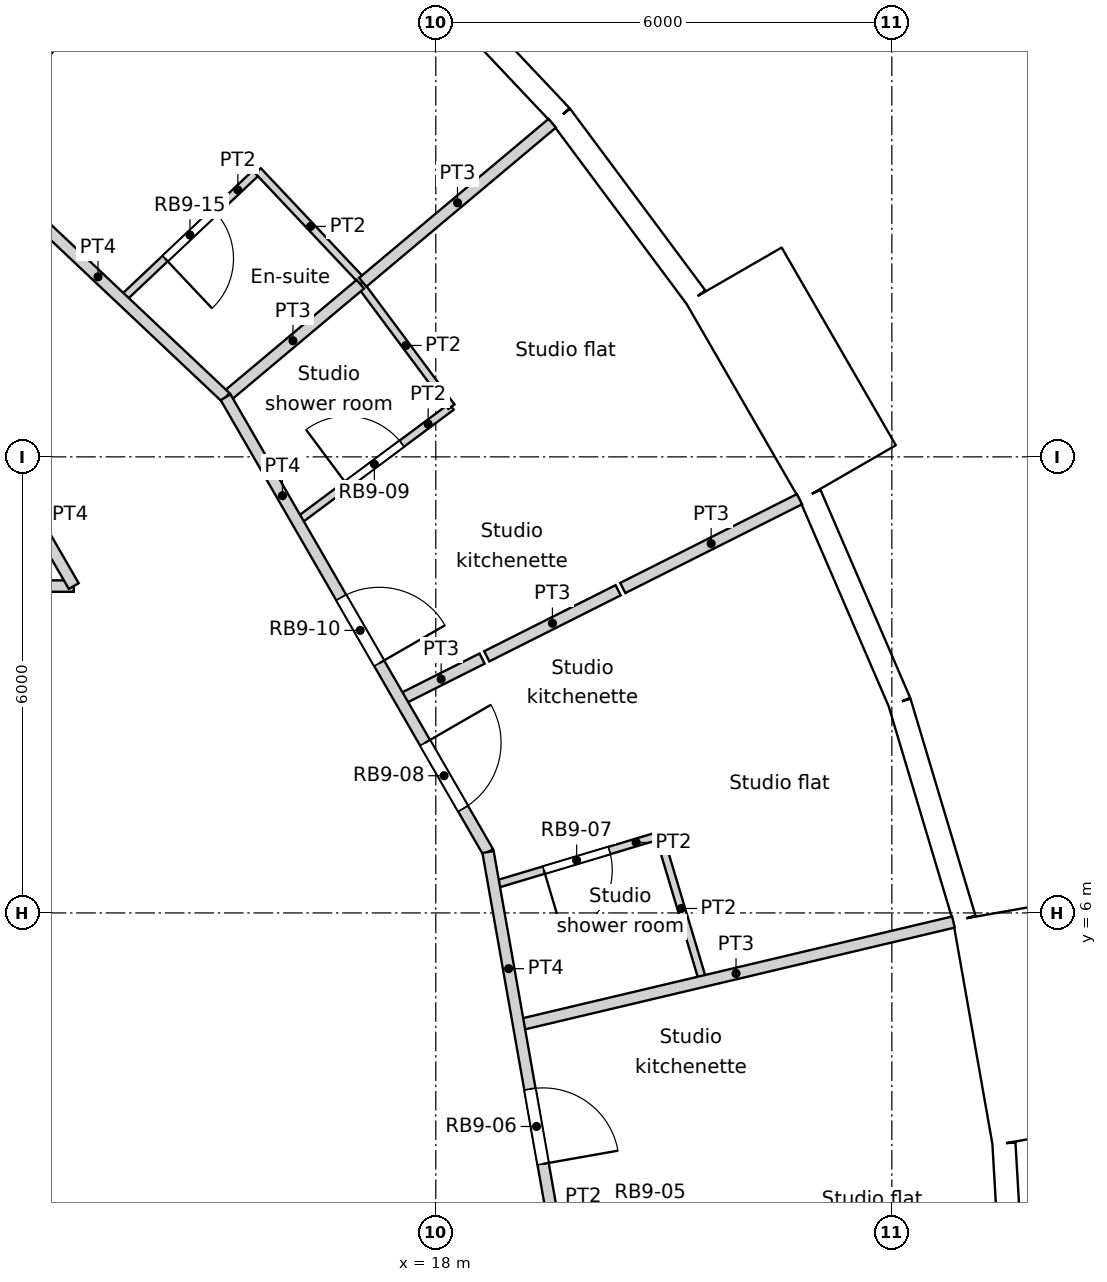
"""IFC4 building model, lengths in metres.
Left out: names, types, materials, properties, quantities, classifications, styles, units other than length and angle.
Written with IfcOpenShell. Run it as: python <this file> out.ifc"""

import sys

from ifc_helpers import new_model, si_unit, direction, frame, frame_2d, origin, origin_2d, place, context, subcontext, project, spatial, rectangle, circle, extrude, element, fill, save


model = new_model("IFC4")
c1 = context("Model", 3, precision=1e-05, world=origin(), true_north=direction((0.0, 1.0)))
c2 = subcontext(c1, "Body", "Model", "MODEL_VIEW")
j1 = project(units=[si_unit("LENGTHUNIT", "METRE"), si_unit("PLANEANGLEUNIT", "RADIAN")], contexts=[c1])
p1 = place(None, origin())
s1 = spatial("IfcSite", under=j1, at=p1, CompositionType="ELEMENT")
p2 = place(p1, origin())
s2 = spatial("IfcBuilding", under=s1, at=p2, CompositionType="ELEMENT")
p3 = place(p2, frame((0.0, 0.0, 212.4)))
s3 = spatial("IfcBuildingStorey", under=s2, at=p3, CompositionType="ELEMENT", Elevation=212.4)
for number, where, z_axis, x_axis in (
    (1, (23.886, 5.661, 0.0), (0.0, 0.0, 1.0), (1.0, 0.0, 0.0)),
    (2, (21.937, 11.017, 0.0), (0.0, 0.0, 1.0), (1.0, 0.0, 0.0)),
    (3, (18.805, 15.779, 0.0), (0.0, 0.0, 1.0), (1.0, 0.0, 0.0)),
):
    element("IfcColumn", number, at=place(p3, frame(where, z_axis=z_axis, x_axis=x_axis)), inside=s3, PredefinedType="COLUMN", context=c2, shape_type="SweptSolid", body=[
        extrude(circle(Radius=0.6, at=origin_2d()), origin(), (0.0, 0.0, 1.0), 3.6),
    ])
for number, where, z_axis, x_axis in (
    (4, (17.986, 5.548, 0.0), (0.0, 0.0, 1.0), (1.0, 0.0, 0.0)),
    (5, (15.552, 10.603, 0.0), (0.0, 0.0, 1.0), (1.0, 0.0, 0.0)),
):
    element("IfcColumn", number, at=place(p3, frame(where, z_axis=z_axis, x_axis=x_axis)), inside=s3, PredefinedType="COLUMN", context=c2, shape_type="SweptSolid", body=[
        extrude(circle(Radius=0.65, at=origin_2d()), origin(), (0.0, 0.0, 1.0), 3.6),
    ])
p4 = place(p3, frame((25.647, 0.0, 0.0), z_axis=(0.0, 0.0, 1.0), x_axis=(-0.058144307138, 0.998308188661, 0.0)))
e6 = element("IfcWall", 6, at=p4, inside=s3, PredefinedType="SOLIDWALL", context=c2, shape_type="SweptSolid", body=[
    extrude(rectangle(XDim=2.973, YDim=0.3, at=frame_2d((1.486, 0.0))), origin(), (0.0, 0.0, 1.0), 3.3),
])
p5 = place(p4, frame((1.486, 0.0, 1.55)))
e7 = element("IfcOpeningElement", 7, at=p5, cuts=e6, PredefinedType="OPENING", context=c2, shape_type="SweptSolid", body=[
    extrude(circle(Radius=0.9, at=origin_2d()), frame((0.0, 0.16, 0.0), z_axis=(0.0, -1.0, 0.0), x_axis=(1.0, 0.0, 0.0)), (0.0, 0.0, 1.0), 0.32),
])
p6 = place(p3, frame((26.042, 3.069, -0.3), z_axis=(0.0, 0.0, 1.0), x_axis=(-0.173669267716, 0.984804034035, 0.0)))
e8 = element("IfcWall", 8, at=p6, inside=s3, PredefinedType="ELEMENTEDWALL", context=c2, shape_type="SweptSolid", body=[
    extrude(rectangle(XDim=3.0, YDim=1.45, at=frame_2d((1.5, 0.0))), origin(), (0.0, 0.0, 1.0), 3.6),
])
p7 = place(p6, frame((1.5, 0.0, 1.85)))
e9 = element("IfcOpeningElement", 9, at=p7, cuts=e8, PredefinedType="OPENING", context=c2, shape_type="SweptSolid", body=[
    extrude(circle(Radius=0.9, at=origin_2d()), frame((0.0, 0.735, 0.0), z_axis=(0.0, -1.0, 0.0), x_axis=(1.0, 0.0, 0.0)), (0.0, 0.0, 1.0), 1.47),
])
p8 = place(p3, frame((24.953, 5.924, 0.0), z_axis=(0.0, 0.0, 1.0), x_axis=(-0.286782750849, 0.957995643944, 0.0)))
e10 = element("IfcWall", 10, at=p8, inside=s3, PredefinedType="SOLIDWALL", context=c2, shape_type="SweptSolid", body=[
    extrude(rectangle(XDim=2.973, YDim=0.3, at=frame_2d((1.486, 0.0))), origin(), (0.0, 0.0, 1.0), 3.3),
])
p9 = place(p8, frame((1.486, 0.0, 1.55)))
e11 = element("IfcOpeningElement", 11, at=p9, cuts=e10, PredefinedType="OPENING", context=c2, shape_type="SweptSolid", body=[
    extrude(circle(Radius=0.9, at=origin_2d()), frame((0.0, 0.16, 0.0), z_axis=(0.0, -1.0, 0.0), x_axis=(1.0, 0.0, 0.0)), (0.0, 0.0, 1.0), 0.32),
])
p10 = place(p3, frame((24.101, 8.772, 0.0), z_axis=(0.0, 0.0, 1.0), x_axis=(-0.396148129016, 0.918186614952, 0.0)))
e12 = element("IfcWall", 12, at=p10, inside=s3, PredefinedType="SOLIDWALL", context=c2, shape_type="SweptSolid", body=[
    extrude(rectangle(XDim=2.973, YDim=0.3, at=frame_2d((1.486, 0.0))), origin(), (0.0, 0.0, 1.0), 3.3),
])
p11 = place(p10, frame((1.486, 0.0, 1.55)))
e13 = element("IfcOpeningElement", 13, at=p11, cuts=e12, PredefinedType="OPENING", context=c2, shape_type="SweptSolid", body=[
    extrude(circle(Radius=0.9, at=origin_2d()), frame((0.0, 0.16, 0.0), z_axis=(0.0, -1.0, 0.0), x_axis=(1.0, 0.0, 0.0)), (0.0, 0.0, 1.0), 0.32),
])
p12 = place(p3, frame((23.422, 11.791, -0.3), z_axis=(0.0, 0.0, 1.0), x_axis=(-0.499990139034, 0.866031096941, 0.0)))
e14 = element("IfcWall", 14, at=p12, inside=s3, PredefinedType="ELEMENTEDWALL", context=c2, shape_type="SweptSolid", body=[
    extrude(rectangle(XDim=3.0, YDim=1.45, at=frame_2d((1.5, 0.0))), origin(), (0.0, 0.0, 1.0), 3.6),
])
p13 = place(p12, frame((1.5, 0.0, 1.85)))
e15 = element("IfcOpeningElement", 15, at=p13, cuts=e14, PredefinedType="OPENING", context=c2, shape_type="SweptSolid", body=[
    extrude(circle(Radius=0.9, at=origin_2d()), frame((0.0, 0.735, 0.0), z_axis=(0.0, -1.0, 0.0), x_axis=(1.0, 0.0, 0.0)), (0.0, 0.0, 1.0), 1.47),
])
p14 = place(p3, frame((21.422, 14.101, 0.0), z_axis=(0.0, 0.0, 1.0), x_axis=(-0.597197580538, 0.80209416517, 0.0)))
e16 = element("IfcWall", 16, at=p14, inside=s3, PredefinedType="SOLIDWALL", context=c2, shape_type="SweptSolid", body=[
    extrude(rectangle(XDim=2.973, YDim=0.3, at=frame_2d((1.486, 0.0))), origin(), (0.0, 0.0, 1.0), 3.3),
])
p15 = place(p14, frame((1.486, 0.0, 1.55)))
e17 = element("IfcOpeningElement", 17, at=p15, cuts=e16, PredefinedType="OPENING", context=c2, shape_type="SweptSolid", body=[
    extrude(circle(Radius=0.9, at=origin_2d()), frame((0.0, 0.16, 0.0), z_axis=(0.0, -1.0, 0.0), x_axis=(1.0, 0.0, 0.0)), (0.0, 0.0, 1.0), 0.32),
])
p16 = place(p3, frame((19.647, 16.486, 0.0), z_axis=(0.0, 0.0, 1.0), x_axis=(-0.686235184166, 0.727379730273, 0.0)))
e18 = element("IfcWall", 18, at=p16, inside=s3, PredefinedType="SOLIDWALL", context=c2, shape_type="SweptSolid", body=[
    extrude(rectangle(XDim=2.973, YDim=0.3, at=frame_2d((1.486, 0.0))), origin(), (0.0, 0.0, 1.0), 3.3),
])
p17 = place(p16, frame((1.486, 0.0, 1.55)))
e19 = element("IfcOpeningElement", 19, at=p17, cuts=e18, PredefinedType="OPENING", context=c2, shape_type="SweptSolid", body=[
    extrude(circle(Radius=0.9, at=origin_2d()), frame((0.0, 0.16, 0.0), z_axis=(0.0, -1.0, 0.0), x_axis=(1.0, 0.0, 0.0)), (0.0, 0.0, 1.0), 0.32),
])
p18 = place(p3, frame((-3.025, 10.3, 0.0), z_axis=(0.0, 0.0, 1.0), x_axis=(1.0, 0.0, 0.0)))
e20 = element("IfcWall", 20, at=p18, inside=s3, PredefinedType="PARTITIONING", context=c2, shape_type="SweptSolid", body=[
    extrude(rectangle(XDim=16.262, YDim=0.15, at=frame_2d((8.131, 0.0))), origin(), (0.0, 0.0, 1.0), 3.15),
])
p19 = place(p18, frame((7.288, 0.0, 0.0)))
e21 = element("IfcOpeningElement", 21, at=p19, cuts=e20, PredefinedType="OPENING", context=c2, shape_type="SweptSolid", body=[
    extrude(rectangle(XDim=0.95, YDim=2.1, at=frame_2d((0.475, 1.05))), frame((0.0, 0.075, 0.0), z_axis=(0.0, -1.0, 0.0), x_axis=(1.0, 0.0, 0.0)), (0.0, 0.0, 1.0), 0.15),
])
p20 = place(p3, frame((12.162, 12.162, 0.0), z_axis=(0.0, 0.0, 1.0), x_axis=(0.499961633463, -0.866047553582, 0.0)))
e22 = element("IfcWall", 22, at=p20, inside=s3, PredefinedType="PARTITIONING", context=c2, shape_type="SweptSolid", body=[
    extrude(rectangle(XDim=2.15, YDim=0.15, at=frame_2d((1.075, 0.0))), origin(), (0.0, 0.0, 1.0), 3.15),
])
p21 = place(p3, frame((18.688, 6.802, 0.0), z_axis=(0.0, 0.0, 1.0), x_axis=(0.173831710537, -0.984775373581, 0.0)))
e23 = element("IfcWall", 23, at=p21, inside=s3, PredefinedType="PARTITIONING", context=c2, shape_type="SweptSolid", body=[
    extrude(rectangle(XDim=6.907, YDim=0.15, at=frame_2d((3.454, 0.0))), origin(), (0.0, 0.0, 1.0), 3.15),
])
p22 = place(p21, frame((3.167, 0.0, 0.0)))
e24 = element("IfcOpeningElement", 24, at=p22, cuts=e23, PredefinedType="OPENING", context=c2, shape_type="SweptSolid", body=[
    extrude(rectangle(XDim=1.0, YDim=2.1, at=frame_2d((0.5, 1.05))), frame((0.0, 0.075, 0.0), z_axis=(0.0, -1.0, 0.0), x_axis=(1.0, 0.0, 0.0)), (0.0, 0.0, 1.0), 0.15),
])
p23 = place(p3, frame((15.235, 12.784, 0.0), z_axis=(0.0, 0.0, 1.0), x_axis=(0.499940714931, -0.86605962933, 0.0)))
e25 = element("IfcWall", 25, at=p23, inside=s3, PredefinedType="PARTITIONING", context=c2, shape_type="SweptSolid", body=[
    extrude(rectangle(XDim=6.907, YDim=0.15, at=frame_2d((3.454, 0.0))), origin(), (0.0, 0.0, 1.0), 3.15),
])
p24 = place(p23, frame((5.249, 0.0, 0.0)))
e26 = element("IfcOpeningElement", 26, at=p24, cuts=e25, PredefinedType="OPENING", context=c2, shape_type="SweptSolid", body=[
    extrude(rectangle(XDim=1.0, YDim=2.1, at=frame_2d((0.5, 1.05))), frame((0.0, 0.075, 0.0), z_axis=(0.0, -1.0, 0.0), x_axis=(1.0, 0.0, 0.0)), (0.0, 0.0, 1.0), 0.15),
])
p25 = place(p23, frame((3.041, 0.0, 0.0)))
e27 = element("IfcOpeningElement", 27, at=p25, cuts=e25, PredefinedType="OPENING", context=c2, shape_type="SweptSolid", body=[
    extrude(rectangle(XDim=1.0, YDim=2.1, at=frame_2d((0.5, 1.05))), frame((0.0, 0.075, 0.0), z_axis=(0.0, -1.0, 0.0), x_axis=(1.0, 0.0, 0.0)), (0.0, 0.0, 1.0), 0.15),
])
p26 = place(p3, frame((11.877, 15.953, 0.0), z_axis=(0.0, 0.0, 1.0), x_axis=(0.727299029876, -0.686320713035, 0.0)))
e28 = element("IfcWall", 28, at=p26, inside=s3, PredefinedType="PARTITIONING", context=c2, shape_type="SweptSolid", body=[
    extrude(rectangle(XDim=4.617, YDim=0.15, at=frame_2d((2.309, 0.0))), origin(), (0.0, 0.0, 1.0), 3.15),
])
p27 = place(p3, frame((19.09, 4.525, 0.0), z_axis=(0.0, 0.0, 1.0), x_axis=(0.973093766115, 0.230409466707, 0.0)))
e29 = element("IfcWall", 29, at=p27, inside=s3, PredefinedType="PARTITIONING", context=c2, shape_type="SweptSolid", body=[
    extrude(rectangle(XDim=5.879, YDim=0.15, at=frame_2d((2.939, 0.0))), origin(), (0.0, 0.0, 1.0), 3.15),
])
p28 = place(p3, frame((20.941, 7.018, 0.0), z_axis=(0.0, 0.0, 1.0), x_axis=(0.287124264191, -0.957893343182, 0.0)))
e30 = element("IfcWall", 30, at=p28, inside=s3, PredefinedType="PARTITIONING", context=c2, shape_type="SweptSolid", body=[
    extrude(rectangle(XDim=2.003, YDim=0.1, at=frame_2d((1.002, 0.0))), origin(), (0.0, 0.0, 1.0), 3.15),
])
p29 = place(p3, frame((18.765, 6.367, 0.0), z_axis=(0.0, 0.0, 1.0), x_axis=(0.958030169919, 0.286667391807, 0.0)))
e31 = element("IfcWall", 31, at=p29, inside=s3, PredefinedType="PARTITIONING", context=c2, shape_type="SweptSolid", body=[
    extrude(rectangle(XDim=2.271, YDim=0.1, at=frame_2d((1.136, 0.0))), origin(), (0.0, 0.0, 1.0), 3.15),
])
p30 = place(p29, frame((0.685, 0.0, 0.0)))
e32 = element("IfcOpeningElement", 32, at=p30, cuts=e31, PredefinedType="OPENING", context=c2, shape_type="SweptSolid", body=[
    extrude(rectangle(XDim=0.9, YDim=2.04, at=frame_2d((0.45, 1.02))), frame((0.0, 0.05, 0.0), z_axis=(0.0, -1.0, 0.0), x_axis=(1.0, 0.0, 0.0)), (0.0, 0.0, 1.0), 0.1),
])
p31 = place(p3, frame((17.532, 8.805, 0.0), z_axis=(0.0, 0.0, 1.0), x_axis=(0.893574741649, 0.448914447403, 0.0)))
e33 = element("IfcWall", 33, at=p31, inside=s3, PredefinedType="PARTITIONING", context=c2, shape_type="SweptSolid", body=[
    extrude(rectangle(XDim=1.205, YDim=0.15, at=frame_2d((0.603, 0.0))), origin(), (0.0, 0.0, 1.0), 3.15),
])
p32 = place(p3, frame((20.46, 10.275, 0.0), z_axis=(0.0, 0.0, 1.0), x_axis=(0.893543449143, 0.448976730458, 0.0)))
e34 = element("IfcWall", 34, at=p32, inside=s3, PredefinedType="PARTITIONING", context=c2, shape_type="SweptSolid", body=[
    extrude(rectangle(XDim=2.602, YDim=0.15, at=frame_2d((1.301, 0.0))), origin(), (0.0, 0.0, 1.0), 3.15),
])
p33 = place(p3, frame((18.67, 9.376, 0.0), z_axis=(0.0, 0.0, 1.0), x_axis=(0.893466318026, 0.449130202227, 0.0)))
e35 = element("IfcWall", 35, at=p33, inside=s3, PredefinedType="PARTITIONING", context=c2, shape_type="SweptSolid", body=[
    extrude(rectangle(XDim=1.935, YDim=0.15, at=frame_2d((0.968, 0.0))), origin(), (0.0, 0.0, 1.0), 3.15),
])
p34 = place(p3, frame((16.178, 11.15, 0.0), z_axis=(0.0, 0.0, 1.0), x_axis=(0.8020923136, 0.597200067367, 0.0)))
e36 = element("IfcWall", 36, at=p34, inside=s3, PredefinedType="PARTITIONING", context=c2, shape_type="SweptSolid", body=[
    extrude(rectangle(XDim=2.529, YDim=0.1, at=frame_2d((1.264, 0.0))), origin(), (0.0, 0.0, 1.0), 3.15),
])
p35 = place(p34, frame((0.814, 0.0, 0.0)))
e37 = element("IfcOpeningElement", 37, at=p35, cuts=e36, PredefinedType="OPENING", context=c2, shape_type="SweptSolid", body=[
    extrude(rectangle(XDim=0.9, YDim=2.04, at=frame_2d((0.45, 1.02))), frame((0.0, 0.05, 0.0), z_axis=(0.0, -1.0, 0.0), x_axis=(1.0, 0.0, 0.0)), (0.0, 0.0, 1.0), 0.1),
])
p36 = place(p3, frame((17.007, 14.271, 0.0), z_axis=(0.0, 0.0, 1.0), x_axis=(0.597019866774, -0.802226450996, 0.0)))
e38 = element("IfcWall", 38, at=p36, inside=s3, PredefinedType="PARTITIONING", context=c2, shape_type="SweptSolid", body=[
    extrude(rectangle(XDim=2.008, YDim=0.1, at=frame_2d((1.004, 0.0))), origin(), (0.0, 0.0, 1.0), 3.15),
])
p37 = place(p3, frame((17.039, 14.297, 0.0), z_axis=(0.0, 0.0, 1.0), x_axis=(0.766046154737, 0.642785569854, 0.0)))
e39 = element("IfcWall", 39, at=p37, inside=s3, PredefinedType="PARTITIONING", context=c2, shape_type="SweptSolid", body=[
    extrude(rectangle(XDim=3.254, YDim=0.15, at=frame_2d((1.627, 0.0))), origin(), (0.0, 0.0, 1.0), 3.15),
])
p38 = place(p3, frame((15.235, 12.784, 0.0), z_axis=(0.0, 0.0, 1.0), x_axis=(0.766002094084, 0.642838075925, 0.0)))
e40 = element("IfcWall", 40, at=p38, inside=s3, PredefinedType="PARTITIONING", context=c2, shape_type="SweptSolid", body=[
    extrude(rectangle(XDim=2.313, YDim=0.15, at=frame_2d((1.157, 0.0))), origin(), (0.0, 0.0, 1.0), 3.15),
])
p39 = place(p3, frame((11.876, 15.952, 0.0), z_axis=(0.0, 0.0, 1.0), x_axis=(0.596899091673, 0.802316318144, 0.0)))
e41 = element("IfcWall", 41, at=p39, inside=s3, PredefinedType="PARTITIONING", context=c2, shape_type="SweptSolid", body=[
    extrude(rectangle(XDim=2.094, YDim=0.1, at=frame_2d((1.047, 0.0))), origin(), (0.0, 0.0, 1.0), 3.15),
])
p40 = place(p3, frame((15.662, 15.763, 0.0), z_axis=(0.0, 0.0, 1.0), x_axis=(0.686167098493, -0.727443958629, 0.0)))
e42 = element("IfcWall", 42, at=p40, inside=s3, PredefinedType="PARTITIONING", context=c2, shape_type="SweptSolid", body=[
    extrude(rectangle(XDim=2.011, YDim=0.1, at=frame_2d((1.005, 0.0))), origin(), (0.0, 0.0, 1.0), 3.15),
])
p41 = place(p3, frame((13.87, 14.072, 0.0), z_axis=(0.0, 0.0, 1.0), x_axis=(0.727320856717, 0.686297582237, 0.0)))
e43 = element("IfcWall", 43, at=p41, inside=s3, PredefinedType="PARTITIONING", context=c2, shape_type="SweptSolid", body=[
    extrude(rectangle(XDim=2.464, YDim=0.1, at=frame_2d((1.232, 0.0))), origin(), (0.0, 0.0, 1.0), 3.15),
])
p42 = place(p41, frame((0.782, 0.0, 0.0)))
e44 = element("IfcOpeningElement", 44, at=p42, cuts=e43, PredefinedType="OPENING", context=c2, shape_type="SweptSolid", body=[
    extrude(rectangle(XDim=0.9, YDim=2.04, at=frame_2d((0.45, 1.02))), frame((0.0, 0.05, 0.0), z_axis=(0.0, -1.0, 0.0), x_axis=(1.0, 0.0, 0.0)), (0.0, 0.0, 1.0), 0.1),
])
p43 = place(p5, origin())
e45 = element("IfcWindow", 45, at=p43, inside=s3, PartitioningType="SINGLE_PANEL", PredefinedType="WINDOW", context=c2, shape_type="SweptSolid", body=[
    extrude(circle(Radius=0.9, at=origin_2d()), frame((0.0, 0.12, 0.0), z_axis=(0.0, -1.0, 0.0), x_axis=(1.0, 0.0, 0.0)), (0.0, 0.0, 1.0), 0.1),
])
fill(e7, e45)
p44 = place(p7, origin())
e46 = element("IfcWindow", 46, at=p44, inside=s3, PartitioningType="SINGLE_PANEL", PredefinedType="WINDOW", context=c2, shape_type="SweptSolid", body=[
    extrude(circle(Radius=0.9, at=origin_2d()), frame((0.0, 0.695, 0.0), z_axis=(0.0, -1.0, 0.0), x_axis=(1.0, 0.0, 0.0)), (0.0, 0.0, 1.0), 0.1),
])
fill(e9, e46)
p45 = place(p9, origin())
e47 = element("IfcWindow", 47, at=p45, inside=s3, PartitioningType="SINGLE_PANEL", PredefinedType="WINDOW", context=c2, shape_type="SweptSolid", body=[
    extrude(circle(Radius=0.9, at=origin_2d()), frame((0.0, 0.12, 0.0), z_axis=(0.0, -1.0, 0.0), x_axis=(1.0, 0.0, 0.0)), (0.0, 0.0, 1.0), 0.1),
])
fill(e11, e47)
p46 = place(p11, origin())
e48 = element("IfcWindow", 48, at=p46, inside=s3, PartitioningType="SINGLE_PANEL", PredefinedType="WINDOW", context=c2, shape_type="SweptSolid", body=[
    extrude(circle(Radius=0.9, at=origin_2d()), frame((0.0, 0.12, 0.0), z_axis=(0.0, -1.0, 0.0), x_axis=(1.0, 0.0, 0.0)), (0.0, 0.0, 1.0), 0.1),
])
fill(e13, e48)
p47 = place(p13, origin())
e49 = element("IfcWindow", 49, at=p47, inside=s3, PartitioningType="SINGLE_PANEL", PredefinedType="WINDOW", context=c2, shape_type="SweptSolid", body=[
    extrude(circle(Radius=0.9, at=origin_2d()), frame((0.0, 0.695, 0.0), z_axis=(0.0, -1.0, 0.0), x_axis=(1.0, 0.0, 0.0)), (0.0, 0.0, 1.0), 0.1),
])
fill(e15, e49)
p48 = place(p15, origin())
e50 = element("IfcWindow", 50, at=p48, inside=s3, PartitioningType="SINGLE_PANEL", PredefinedType="WINDOW", context=c2, shape_type="SweptSolid", body=[
    extrude(circle(Radius=0.9, at=origin_2d()), frame((0.0, 0.12, 0.0), z_axis=(0.0, -1.0, 0.0), x_axis=(1.0, 0.0, 0.0)), (0.0, 0.0, 1.0), 0.1),
])
fill(e17, e50)
p49 = place(p17, origin())
e51 = element("IfcWindow", 51, at=p49, inside=s3, PartitioningType="SINGLE_PANEL", PredefinedType="WINDOW", context=c2, shape_type="SweptSolid", body=[
    extrude(circle(Radius=0.9, at=origin_2d()), frame((0.0, 0.12, 0.0), z_axis=(0.0, -1.0, 0.0), x_axis=(1.0, 0.0, 0.0)), (0.0, 0.0, 1.0), 0.1),
])
fill(e19, e51)
p50 = place(p22, origin())
e52 = element("IfcDoor", 52, at=p50, inside=s3, OperationType="SINGLE_SWING_RIGHT", PredefinedType="DOOR", context=c2, shape_type="SweptSolid", body=[
    extrude(rectangle(XDim=1.0, YDim=2.1, at=frame_2d((0.5, 1.05))), frame((0.0, 0.025, 0.0), z_axis=(0.0, -1.0, 0.0), x_axis=(1.0, 0.0, 0.0)), (0.0, 0.0, 1.0), 0.05),
])
fill(e24, e52)
p51 = place(p30, origin())
e53 = element("IfcDoor", 53, at=p51, inside=s3, OperationType="SINGLE_SWING_RIGHT", PredefinedType="DOOR", context=c2, shape_type="SweptSolid", body=[
    extrude(rectangle(XDim=0.9, YDim=2.04, at=frame_2d((0.45, 1.02))), frame((0.0, 0.025, 0.0), z_axis=(0.0, -1.0, 0.0), x_axis=(1.0, 0.0, 0.0)), (0.0, 0.0, 1.0), 0.05),
])
fill(e32, e53)
p52 = place(p24, origin())
e54 = element("IfcDoor", 54, at=p52, inside=s3, OperationType="SINGLE_SWING_LEFT", PredefinedType="DOOR", context=c2, shape_type="SweptSolid", body=[
    extrude(rectangle(XDim=1.0, YDim=2.1, at=frame_2d((0.5, 1.05))), frame((0.0, 0.025, 0.0), z_axis=(0.0, -1.0, 0.0), x_axis=(1.0, 0.0, 0.0)), (0.0, 0.0, 1.0), 0.05),
])
fill(e26, e54)
p53 = place(p35, origin())
e55 = element("IfcDoor", 55, at=p53, inside=s3, OperationType="SINGLE_SWING_LEFT", PredefinedType="DOOR", context=c2, shape_type="SweptSolid", body=[
    extrude(rectangle(XDim=0.9, YDim=2.04, at=frame_2d((0.45, 1.02))), frame((0.0, 0.025, 0.0), z_axis=(0.0, -1.0, 0.0), x_axis=(1.0, 0.0, 0.0)), (0.0, 0.0, 1.0), 0.05),
])
fill(e37, e55)
p54 = place(p25, origin())
e56 = element("IfcDoor", 56, at=p54, inside=s3, OperationType="SINGLE_SWING_RIGHT", PredefinedType="DOOR", context=c2, shape_type="SweptSolid", body=[
    extrude(rectangle(XDim=1.0, YDim=2.1, at=frame_2d((0.5, 1.05))), frame((0.0, 0.025, 0.0), z_axis=(0.0, -1.0, 0.0), x_axis=(1.0, 0.0, 0.0)), (0.0, 0.0, 1.0), 0.05),
])
fill(e27, e56)
p55 = place(p42, origin())
e57 = element("IfcDoor", 57, at=p55, inside=s3, OperationType="SINGLE_SWING_RIGHT", PredefinedType="DOOR", context=c2, shape_type="SweptSolid", body=[
    extrude(rectangle(XDim=0.9, YDim=2.04, at=frame_2d((0.45, 1.02))), frame((0.0, 0.025, 0.0), z_axis=(0.0, -1.0, 0.0), x_axis=(1.0, 0.0, 0.0)), (0.0, 0.0, 1.0), 0.05),
])
fill(e44, e57)
save(model, sys.argv[1])
